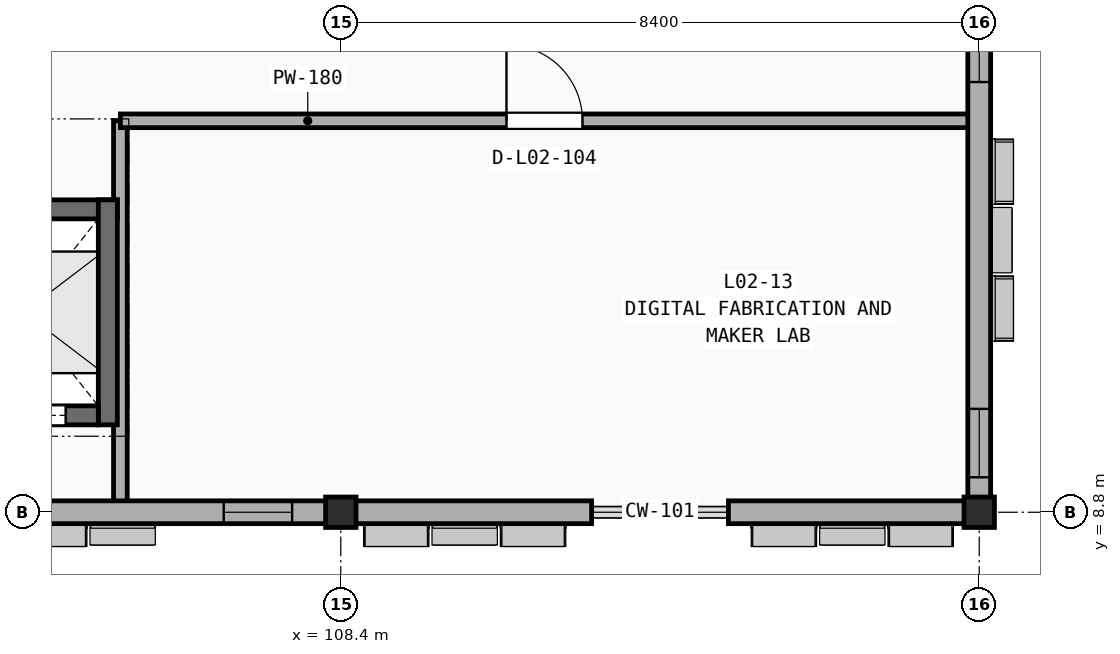
"""IFC4 building model, lengths in metres.
Left out: names, types, materials, properties, quantities, classifications, styles, units other than length and angle.
Written with IfcOpenShell. Run it as: python <this file> out.ifc"""

import sys

from ifc_helpers import new_model, si_unit, direction, frame, frame_2d, origin, origin_2d, place, context, subcontext, project, spatial, rectangle, extrude, element, fill, save


model = new_model("IFC4")
c1 = context("Model", 3, precision=1e-05, world=origin(), true_north=direction((0.0, 1.0)))
c2 = subcontext(c1, "Body", "Model", "MODEL_VIEW")
j1 = project(units=[si_unit("LENGTHUNIT", "METRE"), si_unit("PLANEANGLEUNIT", "RADIAN")], contexts=[c1])
p1 = place(None, origin())
s1 = spatial("IfcSite", under=j1, at=p1, CompositionType="ELEMENT")
p2 = place(p1, origin())
s2 = spatial("IfcBuilding", under=s1, at=p2, CompositionType="ELEMENT")
p3 = place(p2, frame((0.0, 0.0, 9.6)))
s3 = spatial("IfcBuildingStorey", under=s2, at=p3, CompositionType="ELEMENT", Elevation=9.6)
for number, where, z_axis, x_axis in (
    (1, (108.4, 8.8, 0.0), (0.0, 0.0, 1.0), (1.0, 0.0, 0.0)),
    (2, (116.8, 8.8, 0.0), (0.0, 0.0, 1.0), (1.0, 0.0, 0.0)),
):
    element("IfcColumn", number, at=place(p3, frame(where, z_axis=z_axis, x_axis=x_axis)), inside=s3, PredefinedType="COLUMN", context=c2, shape_type="SweptSolid", body=[
        extrude(rectangle(XDim=0.4, YDim=0.4, at=origin_2d()), origin(), (0.0, 0.0, 1.0), 4.2),
    ])
p4 = place(p3, frame((105.5, 8.94, 0.0), z_axis=(0.0, 0.0, 1.0), x_axis=(0.0, 1.0, 0.0)))
e3 = element("IfcWall", 3, at=p4, inside=s3, PredefinedType="PARTITIONING", context=c2, shape_type="SweptSolid", body=[
    extrude(rectangle(XDim=5.01, YDim=0.18, at=frame_2d((2.505, 0.0))), origin(), (0.0, 0.0, 1.0), 3.59),
])
p5 = place(p3, frame((105.5, 13.95, 0.0), z_axis=(0.0, 0.0, 1.0), x_axis=(1.0, 0.0, 0.0)))
e4 = element("IfcWall", 4, at=p5, inside=s3, PredefinedType="PARTITIONING", context=c2, shape_type="SweptSolid", body=[
    extrude(rectangle(XDim=11.16, YDim=0.18, at=frame_2d((5.58, 0.0))), origin(), (0.0, 0.0, 1.0), 3.47),
])
p6 = place(p5, frame((5.08, 0.0, -0.01)))
e5 = element("IfcOpeningElement", 5, at=p6, cuts=e4, PredefinedType="OPENING", context=c2, shape_type="SweptSolid", body=[
    extrude(rectangle(XDim=1.0, YDim=2.16, at=frame_2d((0.5, 1.08))), frame((0.0, 0.1, 0.0), z_axis=(0.0, -1.0, 0.0), x_axis=(1.0, 0.0, 0.0)), (0.0, 0.0, 1.0), 0.2),
])
p7 = place(p3, frame((100.0, 8.8, 0.0), z_axis=(0.0, 0.0, 1.0), x_axis=(1.0, 0.0, 0.0)))
e6 = element("IfcWall", 6, at=p7, inside=s3, PredefinedType="SOLIDWALL", context=c2, shape_type="SweptSolid", body=[
    extrude(rectangle(XDim=8.4, YDim=0.3, at=frame_2d((4.2, 0.0))), origin(), (0.0, 0.0, 1.0), 3.47),
])
p8 = place(p7, frame((0.46, 0.0, 0.85)))
e7 = element("IfcOpeningElement", 7, at=p8, cuts=e6, PredefinedType="OPENING", context=c2, shape_type="SweptSolid", body=[
    extrude(rectangle(XDim=0.9, YDim=2.1, at=frame_2d((0.45, 1.05))), frame((0.0, 0.16, 0.0), z_axis=(0.0, -1.0, 0.0), x_axis=(1.0, 0.0, 0.0)), (0.0, 0.0, 1.0), 0.32),
])
p9 = place(p7, frame((6.86, 0.0, 0.85)))
e8 = element("IfcOpeningElement", 8, at=p9, cuts=e6, PredefinedType="OPENING", context=c2, shape_type="SweptSolid", body=[
    extrude(rectangle(XDim=0.9, YDim=2.1, at=frame_2d((0.45, 1.05))), frame((0.0, 0.16, 0.0), z_axis=(0.0, -1.0, 0.0), x_axis=(1.0, 0.0, 0.0)), (0.0, 0.0, 1.0), 0.32),
])
for number, where, z_axis, x_axis in (
    (9, (108.4, 8.8, 0.0), (0.0, 0.0, 1.0), (1.0, 0.0, 0.0)),
    (10, (113.5, 8.8, 0.0), (0.0, 0.0, 1.0), (1.0, 0.0, 0.0)),
):
    element("IfcWall", number, at=place(p3, frame(where, z_axis=z_axis, x_axis=x_axis)), inside=s3, PredefinedType="SOLIDWALL", context=c2, shape_type="SweptSolid", body=[
        extrude(rectangle(XDim=3.3, YDim=0.3, at=frame_2d((1.65, 0.0))), origin(), (0.0, 0.0, 1.0), 3.47),
    ])
p10 = place(p3, frame((116.8, 8.8, 0.0), z_axis=(0.0, 0.0, 1.0), x_axis=(0.0, 1.0, 0.0)))
e11 = element("IfcWall", 11, at=p10, inside=s3, PredefinedType="SOLIDWALL", context=c2, shape_type="SweptSolid", body=[
    extrude(rectangle(XDim=7.2, YDim=0.3, at=frame_2d((3.6, 0.0))), origin(), (0.0, 0.0, 1.0), 3.27),
])
p11 = place(p10, frame((0.46, 0.0, 0.85)))
e12 = element("IfcOpeningElement", 12, at=p11, cuts=e11, PredefinedType="OPENING", context=c2, shape_type="SweptSolid", body=[
    extrude(rectangle(XDim=0.9, YDim=2.1, at=frame_2d((0.45, 1.05))), frame((0.0, 0.16, 0.0), z_axis=(0.0, -1.0, 0.0), x_axis=(1.0, 0.0, 0.0)), (0.0, 0.0, 1.0), 0.32),
])
p12 = place(p10, frame((5.66, 0.0, 0.85)))
e13 = element("IfcOpeningElement", 13, at=p12, cuts=e11, PredefinedType="OPENING", context=c2, shape_type="SweptSolid", body=[
    extrude(rectangle(XDim=0.9, YDim=2.1, at=frame_2d((0.45, 1.05))), frame((0.0, 0.16, 0.0), z_axis=(0.0, -1.0, 0.0), x_axis=(1.0, 0.0, 0.0)), (0.0, 0.0, 1.0), 0.32),
])
p13 = place(p3, frame((103.25, 12.785, 0.0), z_axis=(0.0, 0.0, 1.0), x_axis=(1.0, 0.0, 0.0)))
e14 = element("IfcWall", 14, at=p13, inside=s3, PredefinedType="SHEAR", context=c2, shape_type="SweptSolid", body=[
    extrude(rectangle(XDim=2.21, YDim=0.25, at=frame_2d((1.105, 0.0))), origin(), (0.0, 0.0, 1.0), 4.2),
])
p14 = place(p3, frame((105.335, 9.95, 0.0), z_axis=(0.0, 0.0, 1.0), x_axis=(0.0, 1.0, 0.0)))
e15 = element("IfcWall", 15, at=p14, inside=s3, PredefinedType="SHEAR", context=c2, shape_type="SweptSolid", body=[
    extrude(rectangle(XDim=2.96, YDim=0.25, at=frame_2d((1.48, 0.0))), origin(), (0.0, 0.0, 1.0), 4.2),
])
p15 = place(p3, frame((103.25, 10.075, 0.0), z_axis=(0.0, 0.0, 1.0), x_axis=(1.0, 0.0, 0.0)))
e16 = element("IfcWall", 16, at=p15, inside=s3, PredefinedType="SHEAR", context=c2, shape_type="SweptSolid", body=[
    extrude(rectangle(XDim=1.96, YDim=0.25, at=frame_2d((0.98, 0.0))), origin(), (0.0, 0.0, 1.0), 4.2),
])
p16 = place(p15, frame((0.43, 0.0, -0.01)))
e17 = element("IfcOpeningElement", 17, at=p16, cuts=e16, PredefinedType="OPENING", context=c2, shape_type="SweptSolid", body=[
    extrude(rectangle(XDim=1.1, YDim=2.16, at=frame_2d((0.55, 1.08))), frame((0.0, 0.135, 0.0), z_axis=(0.0, -1.0, 0.0), x_axis=(1.0, 0.0, 0.0)), (0.0, 0.0, 1.0), 0.27),
])
p17 = place(p6, frame((0.0, 0.0, 0.01)))
e18 = element("IfcDoor", 18, at=p17, inside=s3, OperationType="SINGLE_SWING_LEFT", PredefinedType="DOOR", context=c2, shape_type="SweptSolid", body=[
    extrude(rectangle(XDim=1.0, YDim=2.15, at=frame_2d((0.5, 1.075))), frame((0.0, 0.025, 0.0), z_axis=(0.0, -1.0, 0.0), x_axis=(1.0, 0.0, 0.0)), (0.0, 0.0, 1.0), 0.05),
])
fill(e5, e18)
p18 = place(p9, origin())
e19 = element("IfcWindow", 19, at=p18, inside=s3, PartitioningType="SINGLE_PANEL", PredefinedType="WINDOW", context=c2, shape_type="SweptSolid", body=[
    extrude(rectangle(XDim=0.9, YDim=2.1, at=frame_2d((0.45, 1.05))), frame((0.0, 0.03, 0.0), z_axis=(0.0, -1.0, 0.0), x_axis=(1.0, 0.0, 0.0)), (0.0, 0.0, 1.0), 0.06),
])
fill(e8, e19)
p19 = place(p11, origin())
e20 = element("IfcWindow", 20, at=p19, inside=s3, PartitioningType="SINGLE_PANEL", PredefinedType="WINDOW", context=c2, shape_type="SweptSolid", body=[
    extrude(rectangle(XDim=0.9, YDim=2.1, at=frame_2d((0.45, 1.05))), frame((0.0, 0.03, 0.0), z_axis=(0.0, -1.0, 0.0), x_axis=(1.0, 0.0, 0.0)), (0.0, 0.0, 1.0), 0.06),
])
fill(e12, e20)
p20 = place(p12, origin())
e21 = element("IfcWindow", 21, at=p20, inside=s3, PartitioningType="SINGLE_PANEL", PredefinedType="WINDOW", context=c2, shape_type="SweptSolid", body=[
    extrude(rectangle(XDim=0.9, YDim=2.1, at=frame_2d((0.45, 1.05))), frame((0.0, 0.03, 0.0), z_axis=(0.0, -1.0, 0.0), x_axis=(1.0, 0.0, 0.0)), (0.0, 0.0, 1.0), 0.06),
])
fill(e13, e21)
p21 = place(p16, frame((0.0, 0.0, 0.01)))
e22 = element("IfcDoor", 22, at=p21, inside=s3, OperationType="SLIDING_TO_LEFT", PredefinedType="DOOR", context=c2, shape_type="SweptSolid", body=[
    extrude(rectangle(XDim=1.1, YDim=2.15, at=frame_2d((0.55, 1.075))), frame((0.0, 0.025, 0.0), z_axis=(0.0, -1.0, 0.0), x_axis=(1.0, 0.0, 0.0)), (0.0, 0.0, 1.0), 0.05),
])
fill(e17, e22)
save(model, sys.argv[1])
